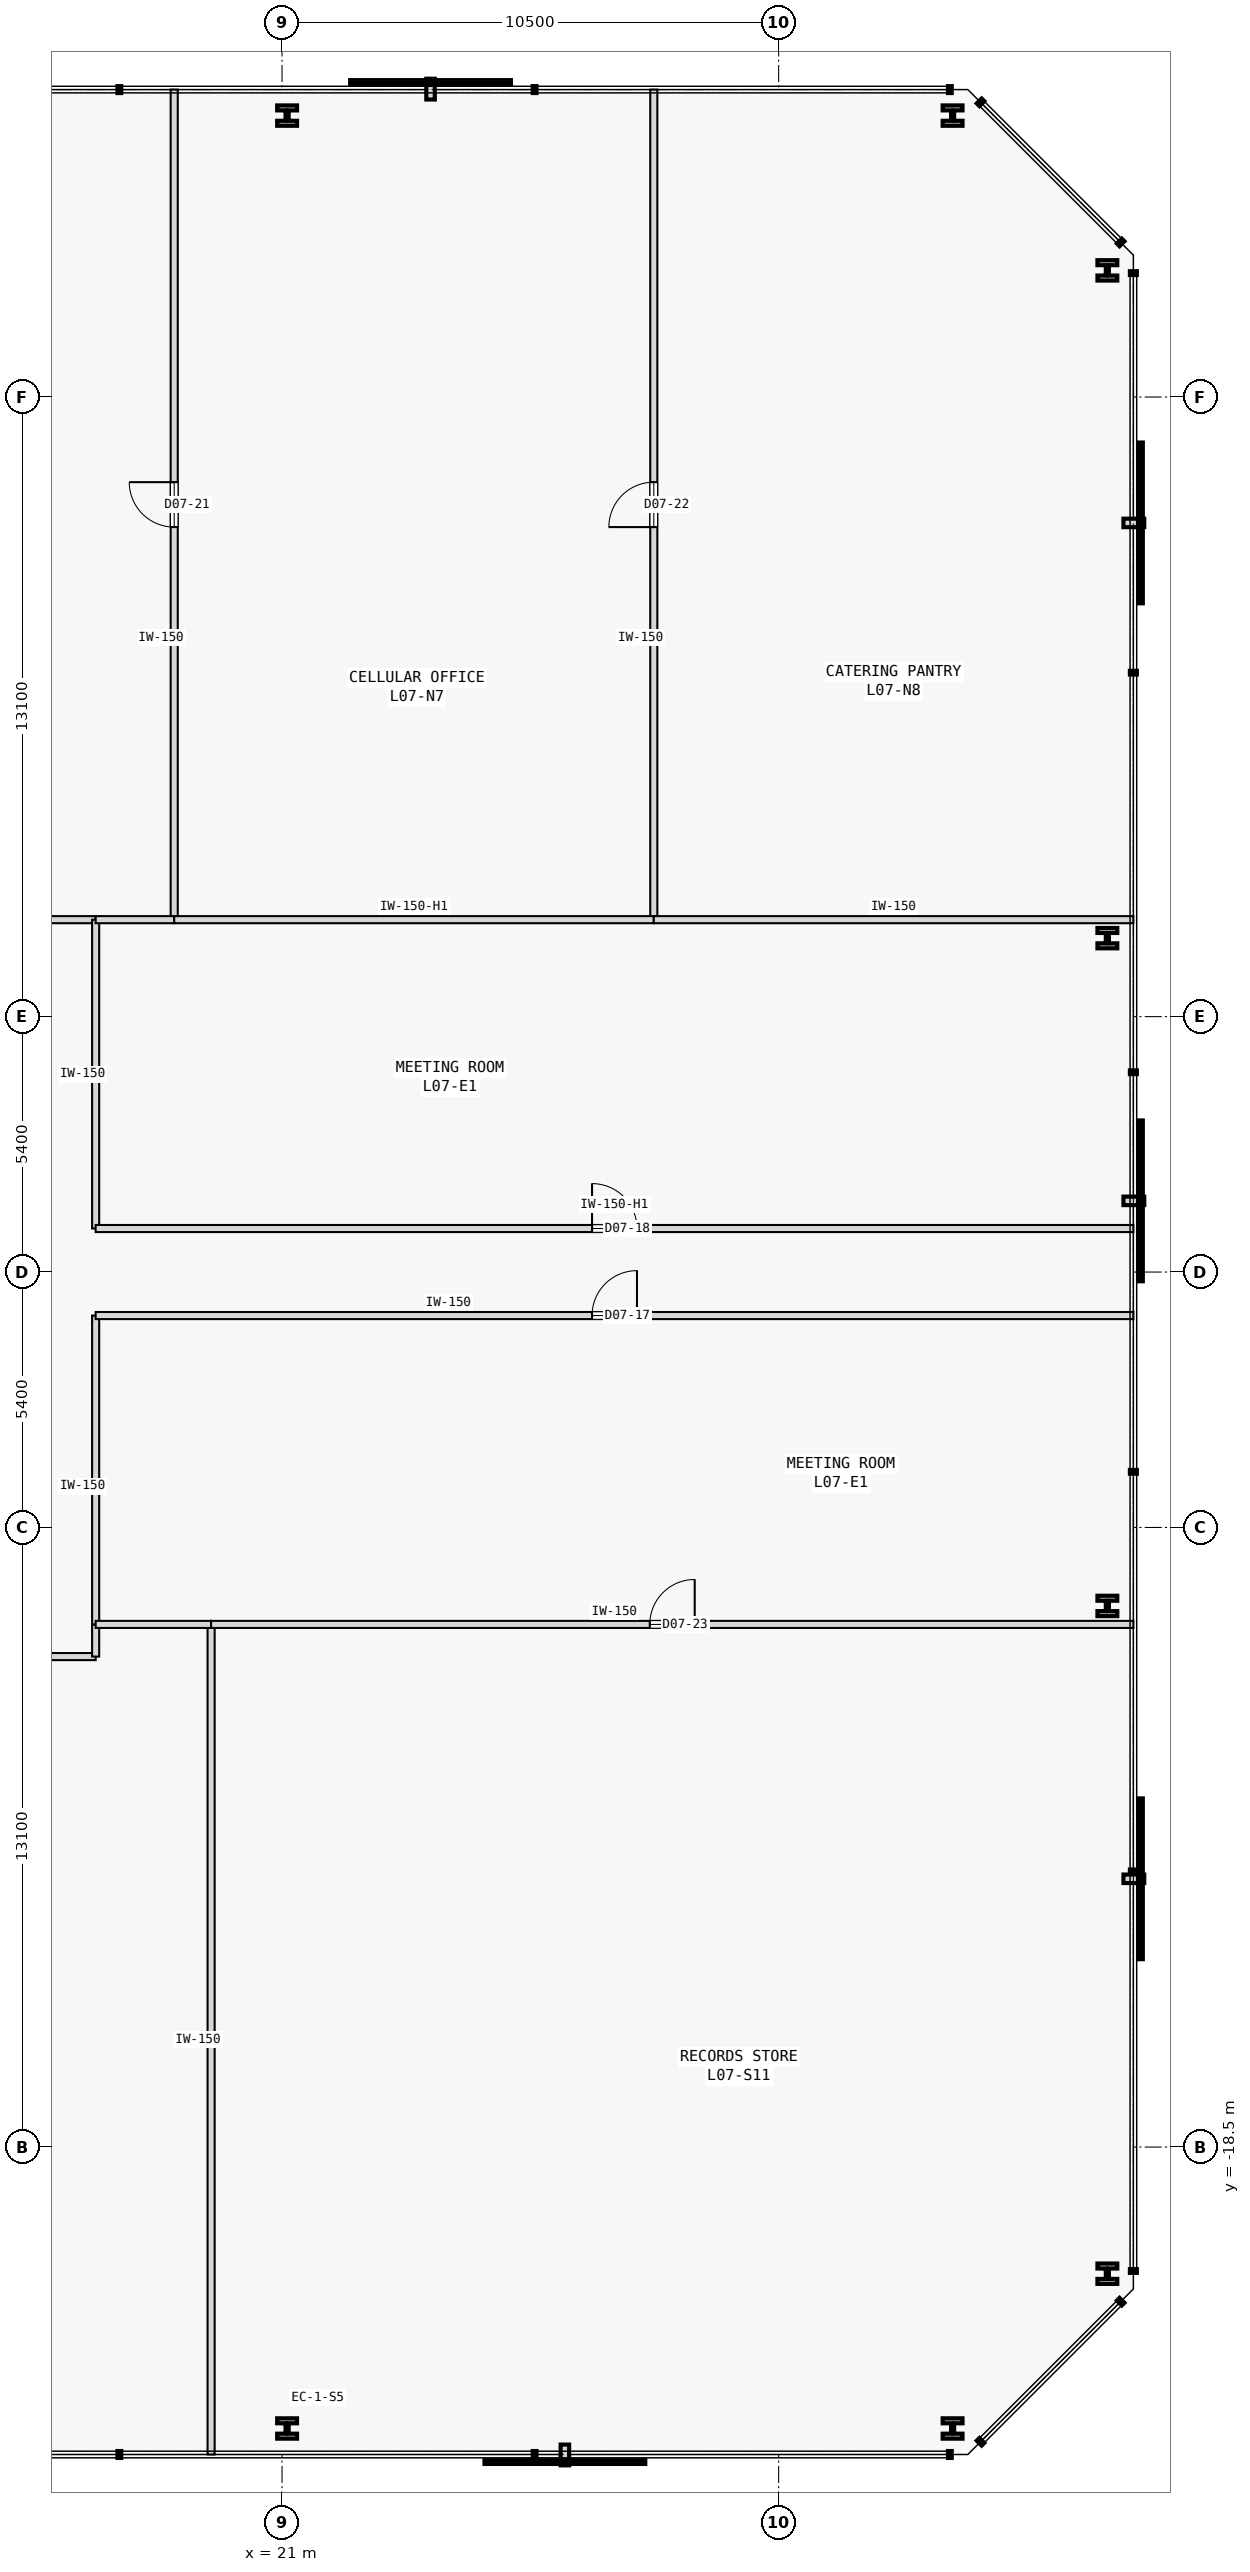
"""IFC4 building model, lengths in metres.
Left out: names, types, materials, properties, quantities, classifications, styles, units other than length and angle.
Written with IfcOpenShell. Run it as: python <this file> out.ifc"""

import sys

from ifc_helpers import new_model, si_unit, direction, frame, frame_2d, origin, origin_2d, place, context, subcontext, project, spatial, rectangle, i_section, extrude, element, fill, save


model = new_model("IFC4")
c1 = context("Model", 3, precision=1e-05, world=origin(), true_north=direction((0.0, 1.0)))
c2 = subcontext(c1, "Body", "Model", "MODEL_VIEW")
j1 = project(units=[si_unit("LENGTHUNIT", "METRE"), si_unit("PLANEANGLEUNIT", "RADIAN")], contexts=[c1])
p1 = place(None, origin())
s1 = spatial("IfcSite", under=j1, at=p1, CompositionType="ELEMENT")
p2 = place(p1, origin())
s2 = spatial("IfcBuilding", under=s1, at=p2, CompositionType="ELEMENT")
p3 = place(p2, frame((0.0, 0.0, 33.2)))
s3 = spatial("IfcBuildingStorey", under=s2, at=p3, CompositionType="ELEMENT", Elevation=33.2)
for number, where, z_axis, x_axis in (
    (1, (21.107, -24.45, 0.0), (0.0, 0.0, 1.0), (1.0, 0.0, 0.0)),
    (2, (35.178, -24.45, 0.0), (0.0, 0.0, 1.0), (1.0, 0.0, 0.0)),
    (3, (38.45, -21.178, 0.0), (0.0, 0.0, 1.0), (1.0, 0.0, 0.0)),
    (4, (38.45, -7.059, 0.0), (0.0, 0.0, 1.0), (1.0, 0.0, 0.0)),
    (5, (38.45, 7.059, 0.0), (0.0, 0.0, 1.0), (1.0, 0.0, 0.0)),
    (6, (38.45, 21.178, 0.0), (0.0, 0.0, 1.0), (1.0, 0.0, 0.0)),
    (7, (35.178, 24.45, 0.0), (0.0, 0.0, 1.0), (1.0, 0.0, 0.0)),
    (8, (21.107, 24.45, 0.0), (0.0, 0.0, 1.0), (1.0, 0.0, 0.0)),
):
    element("IfcColumn", number, at=place(p3, frame(where, z_axis=z_axis, x_axis=x_axis)), inside=s3, PredefinedType="COLUMN", context=c2, shape_type="SweptSolid", body=[
        extrude(i_section(OverallWidth=0.42, OverallDepth=0.431, WebThickness=0.065, FlangeThickness=0.106, FilletRadius=0.015, at=origin_2d()), origin(), (0.0, 0.0, 1.0), 3.8),
    ])
p4 = place(p3, frame((8.58, 7.45, 0.0), z_axis=(0.0, 0.0, 1.0), x_axis=(1.0, 0.0, 0.0)))
e9 = element("IfcWall", 9, at=p4, inside=s3, PredefinedType="PARTITIONING", context=c2, shape_type="SweptSolid", body=[
    extrude(rectangle(XDim=8.479, YDim=0.15, at=frame_2d((4.24, 0.0))), origin(), (0.0, 0.0, 1.0), 3.575),
])
p5 = place(p4, frame((3.764, 0.0, 0.0)))
e10 = element("IfcOpeningElement", 10, at=p5, cuts=e9, PredefinedType="OPENING", context=c2, shape_type="SweptSolid", body=[
    extrude(rectangle(XDim=0.95, YDim=2.15, at=frame_2d((0.475, 1.075))), frame((0.0, 0.085, 0.0), z_axis=(0.0, -1.0, 0.0), x_axis=(1.0, 0.0, 0.0)), (0.0, 0.0, 1.0), 0.17),
])
p6 = place(p3, frame((0.92, -8.13, 0.0), z_axis=(0.0, 0.0, 1.0), x_axis=(1.0, 0.0, 0.0)))
e11 = element("IfcWall", 11, at=p6, inside=s3, PredefinedType="PARTITIONING", context=c2, shape_type="SweptSolid", body=[
    extrude(rectangle(XDim=16.139, YDim=0.15, at=frame_2d((8.07, 0.0))), origin(), (0.0, 0.0, 1.0), 3.575),
])
p7 = place(p3, frame((17.059, -8.13, 0.0), z_axis=(0.0, 0.0, 1.0), x_axis=(0.0, 1.0, 0.0)))
e12 = element("IfcWall", 12, at=p7, inside=s3, PredefinedType="PARTITIONING", context=c2, shape_type="SweptSolid", body=[
    extrude(rectangle(XDim=0.68, YDim=0.15, at=frame_2d((0.34, 0.0))), origin(), (0.0, 0.0, 1.0), 3.575),
])
p8 = place(p3, frame((17.059, -7.45, 0.0), z_axis=(0.0, 0.0, 1.0), x_axis=(0.0, 1.0, 0.0)))
e13 = element("IfcWall", 13, at=p8, inside=s3, PredefinedType="PARTITIONING", context=c2, shape_type="SweptSolid", body=[
    extrude(rectangle(XDim=6.53, YDim=0.15, at=frame_2d((3.265, 0.0))), origin(), (0.0, 0.0, 1.0), 3.575),
])
p9 = place(p3, frame((17.059, -0.92, 0.0), z_axis=(0.0, 0.0, 1.0), x_axis=(1.0, 0.0, 0.0)))
e14 = element("IfcWall", 14, at=p9, inside=s3, PredefinedType="PARTITIONING", context=c2, shape_type="SweptSolid", body=[
    extrude(rectangle(XDim=21.941, YDim=0.15, at=frame_2d((10.97, 0.0))), origin(), (0.0, 0.0, 1.0), 3.575),
])
p10 = place(p9, frame((10.496, 0.0, 0.0)))
e15 = element("IfcOpeningElement", 15, at=p10, cuts=e14, PredefinedType="OPENING", context=c2, shape_type="SweptSolid", body=[
    extrude(rectangle(XDim=0.95, YDim=2.15, at=frame_2d((0.475, 1.075))), frame((0.0, 0.085, 0.0), z_axis=(0.0, -1.0, 0.0), x_axis=(1.0, 0.0, 0.0)), (0.0, 0.0, 1.0), 0.17),
])
p11 = place(p3, frame((17.059, 0.92, 0.0), z_axis=(0.0, 0.0, 1.0), x_axis=(0.0, 1.0, 0.0)))
e16 = element("IfcWall", 16, at=p11, inside=s3, PredefinedType="PARTITIONING", context=c2, shape_type="SweptSolid", body=[
    extrude(rectangle(XDim=6.53, YDim=0.15, at=frame_2d((3.265, 0.0))), origin(), (0.0, 0.0, 1.0), 3.575),
])
p12 = place(p3, frame((17.059, 0.92, 0.0), z_axis=(0.0, 0.0, 1.0), x_axis=(1.0, 0.0, 0.0)))
e17 = element("IfcWall", 17, at=p12, inside=s3, PredefinedType="PARTITIONING", context=c2, shape_type="SweptSolid", body=[
    extrude(rectangle(XDim=21.941, YDim=0.15, at=frame_2d((10.97, 0.0))), origin(), (0.0, 0.0, 1.0), 3.125),
])
p13 = place(p12, frame((10.496, 0.0, 0.0)))
e18 = element("IfcOpeningElement", 18, at=p13, cuts=e17, PredefinedType="OPENING", context=c2, shape_type="SweptSolid", body=[
    extrude(rectangle(XDim=0.95, YDim=2.15, at=frame_2d((0.475, 1.075))), frame((0.0, 0.085, 0.0), z_axis=(0.0, -1.0, 0.0), x_axis=(1.0, 0.0, 0.0)), (0.0, 0.0, 1.0), 0.17),
])
p14 = place(p3, frame((18.72, 7.45, 0.0), z_axis=(0.0, 0.0, 1.0), x_axis=(0.0, 1.0, 0.0)))
e19 = element("IfcWall", 19, at=p14, inside=s3, PredefinedType="PARTITIONING", context=c2, shape_type="SweptSolid", body=[
    extrude(rectangle(XDim=17.55, YDim=0.15, at=frame_2d((8.775, 0.0))), origin(), (0.0, 0.0, 1.0), 3.575),
])
p15 = place(p14, frame((8.3, 0.0, 0.0)))
e20 = element("IfcOpeningElement", 20, at=p15, cuts=e19, PredefinedType="OPENING", context=c2, shape_type="SweptSolid", body=[
    extrude(rectangle(XDim=0.95, YDim=2.15, at=frame_2d((0.475, 1.075))), frame((0.0, 0.085, 0.0), z_axis=(0.0, -1.0, 0.0), x_axis=(1.0, 0.0, 0.0)), (0.0, 0.0, 1.0), 0.17),
])
p16 = place(p3, frame((17.059, 7.45, 0.0), z_axis=(0.0, 0.0, 1.0), x_axis=(1.0, 0.0, 0.0)))
e21 = element("IfcWall", 21, at=p16, inside=s3, PredefinedType="PARTITIONING", context=c2, shape_type="SweptSolid", body=[
    extrude(rectangle(XDim=1.661, YDim=0.15, at=frame_2d((0.831, 0.0))), origin(), (0.0, 0.0, 1.0), 3.575),
])
p17 = place(p3, frame((28.86, 7.45, 0.0), z_axis=(0.0, 0.0, 1.0), x_axis=(0.0, 1.0, 0.0)))
e22 = element("IfcWall", 22, at=p17, inside=s3, PredefinedType="PARTITIONING", context=c2, shape_type="SweptSolid", body=[
    extrude(rectangle(XDim=17.55, YDim=0.15, at=frame_2d((8.775, 0.0))), origin(), (0.0, 0.0, 1.0), 3.575),
])
p18 = place(p17, frame((8.3, 0.0, 0.0)))
e23 = element("IfcOpeningElement", 23, at=p18, cuts=e22, PredefinedType="OPENING", context=c2, shape_type="SweptSolid", body=[
    extrude(rectangle(XDim=0.95, YDim=2.15, at=frame_2d((0.475, 1.075))), frame((0.0, 0.085, 0.0), z_axis=(0.0, -1.0, 0.0), x_axis=(1.0, 0.0, 0.0)), (0.0, 0.0, 1.0), 0.17),
])
p19 = place(p3, frame((18.72, 7.45, 0.0), z_axis=(0.0, 0.0, 1.0), x_axis=(1.0, 0.0, 0.0)))
e24 = element("IfcWall", 24, at=p19, inside=s3, PredefinedType="PARTITIONING", context=c2, shape_type="SweptSolid", body=[
    extrude(rectangle(XDim=10.14, YDim=0.15, at=frame_2d((5.07, 0.0))), origin(), (0.0, 0.0, 1.0), 3.125),
])
p20 = place(p3, frame((28.86, 7.45, 0.0), z_axis=(0.0, 0.0, 1.0), x_axis=(1.0, 0.0, 0.0)))
e25 = element("IfcWall", 25, at=p20, inside=s3, PredefinedType="PARTITIONING", context=c2, shape_type="SweptSolid", body=[
    extrude(rectangle(XDim=10.14, YDim=0.15, at=frame_2d((5.07, 0.0))), origin(), (0.0, 0.0, 1.0), 3.575),
])
p21 = place(p3, frame((19.5, -25.0, 0.0), z_axis=(0.0, 0.0, 1.0), x_axis=(0.0, 1.0, 0.0)))
e26 = element("IfcWall", 26, at=p21, inside=s3, PredefinedType="PARTITIONING", context=c2, shape_type="SweptSolid", body=[
    extrude(rectangle(XDim=17.55, YDim=0.15, at=frame_2d((8.775, 0.0))), origin(), (0.0, 0.0, 1.0), 3.575),
])
p22 = place(p3, frame((17.059, -7.45, 0.0), z_axis=(0.0, 0.0, 1.0), x_axis=(1.0, 0.0, 0.0)))
e27 = element("IfcWall", 27, at=p22, inside=s3, PredefinedType="PARTITIONING", context=c2, shape_type="SweptSolid", body=[
    extrude(rectangle(XDim=2.441, YDim=0.15, at=frame_2d((1.22, 0.0))), origin(), (0.0, 0.0, 1.0), 3.575),
])
p23 = place(p3, frame((19.5, -7.45, 0.0), z_axis=(0.0, 0.0, 1.0), x_axis=(1.0, 0.0, 0.0)))
e28 = element("IfcWall", 28, at=p23, inside=s3, PredefinedType="PARTITIONING", context=c2, shape_type="SweptSolid", body=[
    extrude(rectangle(XDim=19.5, YDim=0.15, at=frame_2d((9.75, 0.0))), origin(), (0.0, 0.0, 1.0), 3.575),
])
p24 = place(p23, frame((9.275, 0.0, 0.0)))
e29 = element("IfcOpeningElement", 29, at=p24, cuts=e28, PredefinedType="OPENING", context=c2, shape_type="SweptSolid", body=[
    extrude(rectangle(XDim=0.95, YDim=2.15, at=frame_2d((0.475, 1.075))), frame((0.0, 0.085, 0.0), z_axis=(0.0, -1.0, 0.0), x_axis=(1.0, 0.0, 0.0)), (0.0, 0.0, 1.0), 0.17),
])
p25 = place(p10, origin())
e30 = element("IfcDoor", 30, at=p25, inside=s3, OperationType="SINGLE_SWING_RIGHT", PredefinedType="DOOR", context=c2, shape_type="SweptSolid", body=[
    extrude(rectangle(XDim=0.95, YDim=2.15, at=frame_2d((0.475, 1.075))), frame((0.0, 0.025, 0.0), z_axis=(0.0, -1.0, 0.0), x_axis=(1.0, 0.0, 0.0)), (0.0, 0.0, 1.0), 0.05),
])
fill(e15, e30)
p26 = place(p13, origin())
e31 = element("IfcDoor", 31, at=p26, inside=s3, OperationType="SINGLE_SWING_LEFT", PredefinedType="DOOR", context=c2, shape_type="SweptSolid", body=[
    extrude(rectangle(XDim=0.95, YDim=2.15, at=frame_2d((0.475, 1.075))), frame((0.0, 0.025, 0.0), z_axis=(0.0, -1.0, 0.0), x_axis=(1.0, 0.0, 0.0)), (0.0, 0.0, 1.0), 0.05),
])
fill(e18, e31)
p27 = place(p15, origin())
e32 = element("IfcDoor", 32, at=p27, inside=s3, OperationType="SINGLE_SWING_RIGHT", PredefinedType="DOOR", context=c2, shape_type="SweptSolid", body=[
    extrude(rectangle(XDim=0.95, YDim=2.15, at=frame_2d((0.475, 1.075))), frame((0.0, 0.025, 0.0), z_axis=(0.0, -1.0, 0.0), x_axis=(1.0, 0.0, 0.0)), (0.0, 0.0, 1.0), 0.05),
])
fill(e20, e32)
p28 = place(p18, origin())
e33 = element("IfcDoor", 33, at=p28, inside=s3, OperationType="SINGLE_SWING_LEFT", PredefinedType="DOOR", context=c2, shape_type="SweptSolid", body=[
    extrude(rectangle(XDim=0.95, YDim=2.15, at=frame_2d((0.475, 1.075))), frame((0.0, 0.025, 0.0), z_axis=(0.0, -1.0, 0.0), x_axis=(1.0, 0.0, 0.0)), (0.0, 0.0, 1.0), 0.05),
])
fill(e23, e33)
p29 = place(p24, origin())
e34 = element("IfcDoor", 34, at=p29, inside=s3, OperationType="SINGLE_SWING_RIGHT", PredefinedType="DOOR", context=c2, shape_type="SweptSolid", body=[
    extrude(rectangle(XDim=0.95, YDim=2.15, at=frame_2d((0.475, 1.075))), frame((0.0, 0.025, 0.0), z_axis=(0.0, -1.0, 0.0), x_axis=(1.0, 0.0, 0.0)), (0.0, 0.0, 1.0), 0.05),
])
fill(e29, e34)
save(model, sys.argv[1])
